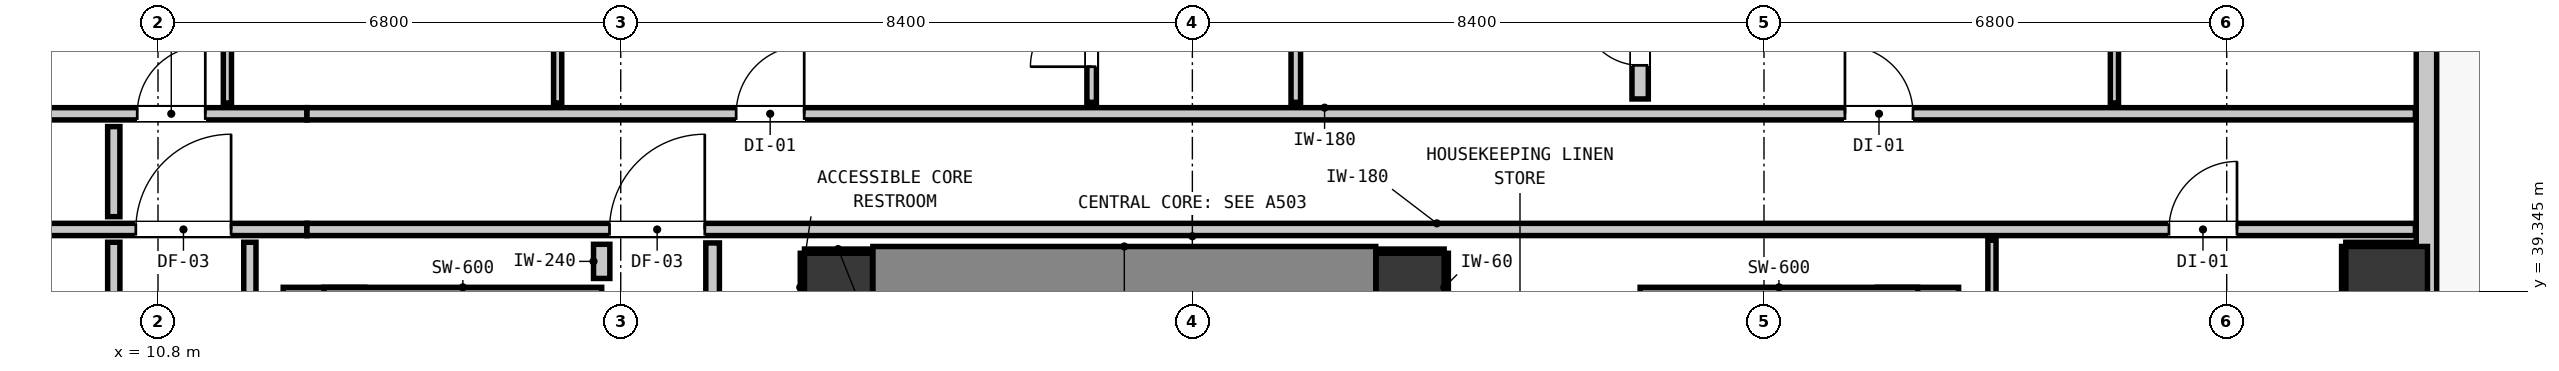
"""IFC4 building model, lengths in metres.
Left out: names, types, materials, properties, quantities, classifications, styles, units other than length and angle.
Written with IfcOpenShell. Run it as: python <this file> out.ifc"""

import sys

from ifc_helpers import new_model, si_unit, direction, frame, frame_2d, origin, origin_2d, place, context, subcontext, project, spatial, rectangle, extrude, element, fill, save


model = new_model("IFC4")
c1 = context("Model", 3, precision=1e-05, world=origin(), true_north=direction((0.0, 1.0)))
c2 = subcontext(c1, "Body", "Model", "MODEL_VIEW")
j1 = project(units=[si_unit("LENGTHUNIT", "METRE"), si_unit("PLANEANGLEUNIT", "RADIAN")], contexts=[c1])
p1 = place(None, origin())
s1 = spatial("IfcSite", under=j1, at=p1, CompositionType="ELEMENT")
p2 = place(p1, origin())
s2 = spatial("IfcBuilding", under=s1, at=p2, CompositionType="ELEMENT")
p3 = place(p2, frame((0.0, 0.0, 22.0)))
s3 = spatial("IfcBuildingStorey", under=s2, at=p3, CompositionType="ELEMENT", Elevation=22.0)
for number, where, z_axis, x_axis in (
    (1, (20.8, 39.4, 0.0), (0.0, 0.0, 1.0), (1.0, 0.0, 0.0)),
    (2, (29.2, 39.4, 0.0), (0.0, 0.0, 1.0), (1.0, 0.0, 0.0)),
):
    element("IfcColumn", number, at=place(p3, frame(where, z_axis=z_axis, x_axis=x_axis)), inside=s3, PredefinedType="COLUMN", context=c2, shape_type="SweptSolid", body=[
        extrude(rectangle(XDim=1.0, YDim=1.0, at=origin_2d()), origin(), (0.0, 0.0, 1.0), 3.32),
    ])
p4 = place(p3, frame((13.24, 31.205, 0.0), z_axis=(0.0, 0.0, 1.0), x_axis=(0.0, 1.0, 0.0)))
e3 = element("IfcWall", 3, at=p4, inside=s3, PredefinedType="SHEAR", context=c2, shape_type="SweptSolid", body=[
    extrude(rectangle(XDim=8.195, YDim=1.2, at=frame_2d((4.097, 0.0))), origin(), (0.0, 0.0, 1.0), 3.32),
])
p5 = place(p3, frame((13.24, 39.1, 0.0), z_axis=(0.0, 0.0, 1.0), x_axis=(1.0, 0.0, 0.0)))
e4 = element("IfcWall", 4, at=p5, inside=s3, PredefinedType="SHEAR", context=c2, shape_type="SweptSolid", body=[
    extrude(rectangle(XDim=4.08, YDim=0.6, at=frame_2d((2.04, 0.0))), origin(), (0.0, 0.0, 1.0), 3.32),
])
p6 = place(p3, frame((36.66, 31.205, 0.0), z_axis=(0.0, 0.0, 1.0), x_axis=(0.0, 1.0, 0.0)))
e5 = element("IfcWall", 5, at=p6, inside=s3, PredefinedType="SHEAR", context=c2, shape_type="SweptSolid", body=[
    extrude(rectangle(XDim=8.195, YDim=1.2, at=frame_2d((4.097, 0.0))), origin(), (0.0, 0.0, 1.0), 3.32),
])
p7 = place(p3, frame((32.58, 39.1, 0.0), z_axis=(0.0, 0.0, 1.0), x_axis=(1.0, 0.0, 0.0)))
e6 = element("IfcWall", 6, at=p7, inside=s3, PredefinedType="SHEAR", context=c2, shape_type="SweptSolid", body=[
    extrude(rectangle(XDim=4.08, YDim=0.6, at=frame_2d((2.04, 0.0))), origin(), (0.0, 0.0, 1.0), 3.32),
])
p8 = place(p3, frame((21.305, 39.4, 0.0), z_axis=(0.0, 0.0, 1.0), x_axis=(1.0, 0.0, 0.0)))
e7 = element("IfcWall", 7, at=p8, inside=s3, PredefinedType="SHEAR", context=c2, shape_type="SweptSolid", body=[
    extrude(rectangle(XDim=7.39, YDim=1.2, at=frame_2d((3.695, 0.0))), origin(), (0.0, 0.0, 1.0), 3.32),
])
p9 = place(p3, frame((43.55, 39.4, -0.2), z_axis=(0.0, 0.0, 1.0), x_axis=(1.0, 0.0, 0.0)))
e8 = element("IfcColumn", 8, at=p9, inside=s3, PredefinedType="COLUMN", context=c2, shape_type="SweptSolid", body=[
    extrude(rectangle(XDim=1.2, YDim=1.2, at=origin_2d()), origin(), (0.0, 0.0, 1.0), 3.52),
])
p10 = place(p3, frame((44.135, 44.835, 0.0), z_axis=(0.0, 0.0, 1.0), x_axis=(0.0, -1.0, 0.0)))
e9 = element("IfcWall", 9, at=p10, inside=s3, PredefinedType="STANDARD", context=c2, shape_type="SweptSolid", body=[
    extrude(rectangle(XDim=34.67, YDim=0.3, at=frame_2d((17.335, 0.0))), origin(), (0.0, 0.0, 1.0), 3.06),
])
p11 = place(p10, frame((0.501, 0.0, 0.0)))
e10 = element("IfcOpeningElement", 10, at=p11, cuts=e9, PredefinedType="OPENING", context=c2, shape_type="SweptSolid", body=[
    extrude(rectangle(XDim=1.1, YDim=2.15, at=frame_2d((0.55, 1.075))), frame((0.0, 0.16, 0.0), z_axis=(0.0, -1.0, 0.0), x_axis=(1.0, 0.0, 0.0)), (0.0, 0.0, 1.0), 0.32),
])
p12 = place(p10, frame((20.21, 0.0, 0.85)))
e11 = element("IfcOpeningElement", 11, at=p12, cuts=e9, PredefinedType="OPENING", context=c2, shape_type="SweptSolid", body=[
    extrude(rectangle(XDim=1.05, YDim=1.65, at=frame_2d((0.525, 0.825))), frame((0.0, 0.16, 0.0), z_axis=(0.0, -1.0, 0.0), x_axis=(1.0, 0.0, 0.0)), (0.0, 0.0, 1.0), 0.32),
])
p13 = place(p10, frame((7.426, 0.0, 0.85)))
e12 = element("IfcOpeningElement", 12, at=p13, cuts=e9, PredefinedType="OPENING", context=c2, shape_type="SweptSolid", body=[
    extrude(rectangle(XDim=1.05, YDim=1.65, at=frame_2d((0.525, 0.825))), frame((0.0, 0.16, 0.0), z_axis=(0.0, -1.0, 0.0), x_axis=(1.0, 0.0, 0.0)), (0.0, 0.0, 1.0), 0.32),
])
p14 = place(p3, frame((2.661, 40.25, 0.0), z_axis=(0.0, 0.0, 1.0), x_axis=(1.0, 0.0, 0.0)))
e13 = element("IfcWall", 13, at=p14, inside=s3, PredefinedType="PARTITIONING", context=c2, shape_type="SweptSolid", body=[
    extrude(rectangle(XDim=10.328, YDim=0.18, at=frame_2d((5.164, 0.0))), origin(), (0.0, 0.0, 1.0), 2.445),
])
p15 = place(p14, frame((7.813, 0.0, 0.0)))
e14 = element("IfcOpeningElement", 14, at=p15, cuts=e13, PredefinedType="OPENING", context=c2, shape_type="SweptSolid", body=[
    extrude(rectangle(XDim=1.4, YDim=2.15, at=frame_2d((0.7, 1.075))), frame((0.0, 0.1, 0.0), z_axis=(0.0, -1.0, 0.0), x_axis=(1.0, 0.0, 0.0)), (0.0, 0.0, 1.0), 0.2),
])
p16 = place(p3, frame((12.989, 40.25, 0.0), z_axis=(0.0, 0.0, 1.0), x_axis=(1.0, 0.0, 0.0)))
e15 = element("IfcWall", 15, at=p16, inside=s3, PredefinedType="PARTITIONING", context=c2, shape_type="SweptSolid", body=[
    extrude(rectangle(XDim=30.984, YDim=0.18, at=frame_2d((15.492, 0.0))), origin(), (0.0, 0.0, 1.0), 3.06),
])
p17 = place(p16, frame((4.446, 0.0, 0.0)))
e16 = element("IfcOpeningElement", 16, at=p17, cuts=e15, PredefinedType="OPENING", context=c2, shape_type="SweptSolid", body=[
    extrude(rectangle(XDim=1.4, YDim=2.15, at=frame_2d((0.7, 1.075))), frame((0.0, 0.1, 0.0), z_axis=(0.0, -1.0, 0.0), x_axis=(1.0, 0.0, 0.0)), (0.0, 0.0, 1.0), 0.2),
])
p18 = place(p16, frame((27.362, 0.0, 0.0)))
e17 = element("IfcOpeningElement", 17, at=p18, cuts=e15, PredefinedType="OPENING", context=c2, shape_type="SweptSolid", body=[
    extrude(rectangle(XDim=1.0, YDim=2.15, at=frame_2d((0.5, 1.075))), frame((0.0, 0.1, 0.0), z_axis=(0.0, -1.0, 0.0), x_axis=(1.0, 0.0, 0.0)), (0.0, 0.0, 1.0), 0.2),
])
p19 = place(p3, frame((2.661, 41.95, 0.0), z_axis=(0.0, 0.0, 1.0), x_axis=(1.0, 0.0, 0.0)))
e18 = element("IfcWall", 18, at=p19, inside=s3, PredefinedType="PARTITIONING", context=c2, shape_type="SweptSolid", body=[
    extrude(rectangle(XDim=10.328, YDim=0.18, at=frame_2d((5.164, 0.0))), origin(), (0.0, 0.0, 1.0), 2.445),
])
p20 = place(p19, frame((7.834, 0.0, 0.0)))
e19 = element("IfcOpeningElement", 19, at=p20, cuts=e18, PredefinedType="OPENING", context=c2, shape_type="SweptSolid", body=[
    extrude(rectangle(XDim=1.0, YDim=2.15, at=frame_2d((0.5, 1.075))), frame((0.0, 0.1, 0.0), z_axis=(0.0, -1.0, 0.0), x_axis=(1.0, 0.0, 0.0)), (0.0, 0.0, 1.0), 0.2),
])
p21 = place(p3, frame((12.989, 41.95, 0.0), z_axis=(0.0, 0.0, 1.0), x_axis=(1.0, 0.0, 0.0)))
e20 = element("IfcWall", 20, at=p21, inside=s3, PredefinedType="PARTITIONING", context=c2, shape_type="SweptSolid", body=[
    extrude(rectangle(XDim=30.984, YDim=0.18, at=frame_2d((15.492, 0.0))), origin(), (0.0, 0.0, 1.0), 3.06),
])
p22 = place(p21, frame((6.307, 0.0, 0.0)))
e21 = element("IfcOpeningElement", 21, at=p22, cuts=e20, PredefinedType="OPENING", context=c2, shape_type="SweptSolid", body=[
    extrude(rectangle(XDim=1.0, YDim=2.15, at=frame_2d((0.5, 1.075))), frame((0.0, 0.1, 0.0), z_axis=(0.0, -1.0, 0.0), x_axis=(1.0, 0.0, 0.0)), (0.0, 0.0, 1.0), 0.2),
])
p23 = place(p21, frame((22.601, 0.0, 0.0)))
e22 = element("IfcOpeningElement", 22, at=p23, cuts=e20, PredefinedType="OPENING", context=c2, shape_type="SweptSolid", body=[
    extrude(rectangle(XDim=1.0, YDim=2.15, at=frame_2d((0.5, 1.075))), frame((0.0, 0.1, 0.0), z_axis=(0.0, -1.0, 0.0), x_axis=(1.0, 0.0, 0.0)), (0.0, 0.0, 1.0), 0.2),
])
p24 = place(p3, frame((17.32, 39.53, 0.0), z_axis=(0.0, 0.0, 1.0), x_axis=(0.0, 1.0, 0.0)))
e23 = element("IfcWall", 23, at=p24, inside=s3, PredefinedType="PARTITIONING", context=c2, shape_type="SweptSolid", body=[
    extrude(rectangle(XDim=0.502, YDim=0.24, at=frame_2d((0.251, 0.0))), origin(), (0.0, 0.0, 1.0), 3.06),
])
p25 = place(p3, frame((32.58, 42.168, 0.0), z_axis=(0.0, 0.0, 1.0), x_axis=(0.0, 1.0, 0.0)))
e24 = element("IfcWall", 24, at=p25, inside=s3, PredefinedType="PARTITIONING", context=c2, shape_type="SweptSolid", body=[
    extrude(rectangle(XDim=1.842, YDim=0.24, at=frame_2d((0.921, 0.0))), origin(), (0.0, 0.0, 1.0), 3.06),
])
p26 = place(p25, frame((0.494, 0.0, 0.0)))
e25 = element("IfcOpeningElement", 25, at=p26, cuts=e24, PredefinedType="OPENING", context=c2, shape_type="SweptSolid", body=[
    extrude(rectangle(XDim=0.86, YDim=2.02, at=frame_2d((0.43, 1.01))), frame((0.0, 0.13, 0.0), z_axis=(0.0, -1.0, 0.0), x_axis=(1.0, 0.0, 0.0)), (0.0, 0.0, 1.0), 0.26),
])
p27 = place(p3, frame((18.95, 38.928, 0.0), z_axis=(0.0, 0.0, 1.0), x_axis=(0.0, 1.0, 0.0)))
e26 = element("IfcWall", 26, at=p27, inside=s3, PredefinedType="PARTITIONING", context=c2, shape_type="SweptSolid", body=[
    extrude(rectangle(XDim=1.124, YDim=0.2, at=frame_2d((0.562, 0.0))), origin(), (0.0, 0.0, 1.0), 3.06),
])
p28 = place(p3, frame((10.15, 37.313, 0.0), z_axis=(0.0, 0.0, 1.0), x_axis=(0.0, 1.0, 0.0)))
e27 = element("IfcWall", 27, at=p28, inside=s3, PredefinedType="PARTITIONING", context=c2, shape_type="SweptSolid", body=[
    extrude(rectangle(XDim=2.749, YDim=0.18, at=frame_2d((1.375, 0.0))), origin(), (0.0, 0.0, 1.0), 3.06),
])
p29 = place(p3, frame((10.15, 40.438, 0.0), z_axis=(0.0, 0.0, 1.0), x_axis=(0.0, 1.0, 0.0)))
e28 = element("IfcWall", 28, at=p29, inside=s3, PredefinedType="PARTITIONING", context=c2, shape_type="SweptSolid", body=[
    extrude(rectangle(XDim=1.324, YDim=0.18, at=frame_2d((0.662, 0.0))), origin(), (0.0, 0.0, 1.0), 3.06),
])
p30 = place(p3, frame((12.15, 21.368, 0.0), z_axis=(0.0, 0.0, 1.0), x_axis=(0.0, 1.0, 0.0)))
e29 = element("IfcWall", 29, at=p30, inside=s3, PredefinedType="PARTITIONING", context=c2, shape_type="SweptSolid", body=[
    extrude(rectangle(XDim=18.694, YDim=0.18, at=frame_2d((9.347, 0.0))), origin(), (0.0, 0.0, 1.0), 3.06),
])
p31 = place(p3, frame((24.52, 42.118, 0.0), z_axis=(0.0, 0.0, 1.0), x_axis=(0.0, 1.0, 0.0)))
e30 = element("IfcWall", 30, at=p31, inside=s3, PredefinedType="PARTITIONING", context=c2, shape_type="SweptSolid", body=[
    extrude(rectangle(XDim=1.942, YDim=0.14, at=frame_2d((0.971, 0.0))), origin(), (0.0, 0.0, 1.0), 3.06),
])
p32 = place(p31, frame((0.524, 0.0, 0.0)))
e31 = element("IfcOpeningElement", 31, at=p32, cuts=e30, PredefinedType="OPENING", context=c2, shape_type="SweptSolid", body=[
    extrude(rectangle(XDim=0.9, YDim=2.1, at=frame_2d((0.45, 1.05))), frame((0.0, 0.08, 0.0), z_axis=(0.0, -1.0, 0.0), x_axis=(1.0, 0.0, 0.0)), (0.0, 0.0, 1.0), 0.16),
])
p33 = place(p3, frame((27.52, 42.118, 0.0), z_axis=(0.0, 0.0, 1.0), x_axis=(0.0, 1.0, 0.0)))
e32 = element("IfcWall", 32, at=p33, inside=s3, PredefinedType="PARTITIONING", context=c2, shape_type="SweptSolid", body=[
    extrude(rectangle(XDim=1.942, YDim=0.14, at=frame_2d((0.971, 0.0))), origin(), (0.0, 0.0, 1.0), 3.06),
])
p34 = place(p3, frame((11.82, 42.108, 0.0), z_axis=(0.0, 0.0, 1.0), x_axis=(0.0, 1.0, 0.0)))
e33 = element("IfcWall", 33, at=p34, inside=s3, PredefinedType="PARTITIONING", context=c2, shape_type="SweptSolid", body=[
    extrude(rectangle(XDim=5.065, YDim=0.12, at=frame_2d((2.533, 0.0))), origin(), (0.0, 0.0, 1.0), 3.06),
])
p35 = place(p34, frame((2.017, 0.0, 0.0)))
e34 = element("IfcOpeningElement", 34, at=p35, cuts=e33, PredefinedType="OPENING", context=c2, shape_type="SweptSolid", body=[
    extrude(rectangle(XDim=0.9, YDim=2.1, at=frame_2d((0.45, 1.05))), frame((0.0, 0.07, 0.0), z_axis=(0.0, -1.0, 0.0), x_axis=(1.0, 0.0, 0.0)), (0.0, 0.0, 1.0), 0.14),
])
p36 = place(p3, frame((16.673, 42.108, 0.0), z_axis=(0.0, 0.0, 1.0), x_axis=(0.0, 1.0, 0.0)))
e35 = element("IfcWall", 35, at=p36, inside=s3, PredefinedType="PARTITIONING", context=c2, shape_type="SweptSolid", body=[
    extrude(rectangle(XDim=5.065, YDim=0.12, at=frame_2d((2.533, 0.0))), origin(), (0.0, 0.0, 1.0), 3.06),
])
p37 = place(p3, frame((37.75, 35.006, 0.0), z_axis=(0.0, 0.0, 1.0), x_axis=(0.0, 1.0, 0.0)))
e36 = element("IfcWall", 36, at=p37, inside=s3, PredefinedType="PARTITIONING", context=c2, shape_type="SweptSolid", body=[
    extrude(rectangle(XDim=5.086, YDim=0.12, at=frame_2d((2.543, 0.0))), origin(), (0.0, 0.0, 1.0), 3.06),
])
p38 = place(p3, frame((39.55, 42.108, 0.0), z_axis=(0.0, 0.0, 1.0), x_axis=(0.0, 1.0, 0.0)))
e37 = element("IfcWall", 37, at=p38, inside=s3, PredefinedType="PARTITIONING", context=c2, shape_type="SweptSolid", body=[
    extrude(rectangle(XDim=5.065, YDim=0.12, at=frame_2d((2.533, 0.0))), origin(), (0.0, 0.0, 1.0), 3.06),
])
p39 = place(p38, frame((2.017, 0.0, 0.0)))
e38 = element("IfcOpeningElement", 38, at=p39, cuts=e37, PredefinedType="OPENING", context=c2, shape_type="SweptSolid", body=[
    extrude(rectangle(XDim=0.9, YDim=2.1, at=frame_2d((0.45, 1.05))), frame((0.0, 0.07, 0.0), z_axis=(0.0, -1.0, 0.0), x_axis=(1.0, 0.0, 0.0)), (0.0, 0.0, 1.0), 0.14),
])
p40 = place(p3, frame((20.3, 39.932, 0.0), z_axis=(0.0, 0.0, 1.0), x_axis=(1.0, 0.0, 0.0)))
e39 = element("IfcWall", 39, at=p40, inside=s3, PredefinedType="PARTITIONING", context=c2, shape_type="SweptSolid", body=[
    extrude(rectangle(XDim=0.99, YDim=0.06, at=frame_2d((0.495, 0.0))), origin(), (0.0, 0.0, 1.0), 1.45),
])
p41 = place(p3, frame((20.268, 38.9, 0.0), z_axis=(0.0, 0.0, 1.0), x_axis=(0.0, 1.0, 0.0)))
e40 = element("IfcWall", 40, at=p41, inside=s3, PredefinedType="PARTITIONING", context=c2, shape_type="SweptSolid", body=[
    extrude(rectangle(XDim=1.0, YDim=0.06, at=frame_2d((0.5, 0.0))), origin(), (0.0, 0.0, 1.0), 1.45),
])
p42 = place(p3, frame((28.71, 39.932, 0.0), z_axis=(0.0, 0.0, 1.0), x_axis=(1.0, 0.0, 0.0)))
e41 = element("IfcWall", 41, at=p42, inside=s3, PredefinedType="PARTITIONING", context=c2, shape_type="SweptSolid", body=[
    extrude(rectangle(XDim=0.99, YDim=0.06, at=frame_2d((0.495, 0.0))), origin(), (0.0, 0.0, 1.0), 1.45),
])
p43 = place(p3, frame((29.732, 38.9, 0.0), z_axis=(0.0, 0.0, 1.0), x_axis=(0.0, 1.0, 0.0)))
e42 = element("IfcWall", 42, at=p43, inside=s3, PredefinedType="PARTITIONING", context=c2, shape_type="SweptSolid", body=[
    extrude(rectangle(XDim=1.0, YDim=0.06, at=frame_2d((0.5, 0.0))), origin(), (0.0, 0.0, 1.0), 1.45),
])
p44 = place(p3, frame((42.95, 40.032, 0.0), z_axis=(0.0, 0.0, 1.0), x_axis=(1.0, 0.0, 0.0)))
e43 = element("IfcWall", 43, at=p44, inside=s3, PredefinedType="PARTITIONING", context=c2, shape_type="SweptSolid", body=[
    extrude(rectangle(XDim=1.02, YDim=0.06, at=frame_2d((0.51, 0.0))), origin(), (0.0, 0.0, 1.0), 1.45),
])
p45 = place(p3, frame((42.918, 38.8, 0.0), z_axis=(0.0, 0.0, 1.0), x_axis=(0.0, 1.0, 0.0)))
e44 = element("IfcWall", 44, at=p45, inside=s3, PredefinedType="PARTITIONING", context=c2, shape_type="SweptSolid", body=[
    extrude(rectangle(XDim=1.2, YDim=0.06, at=frame_2d((0.6, 0.0))), origin(), (0.0, 0.0, 1.0), 1.45),
])
p46 = place(p17, origin())
e45 = element("IfcDoor", 45, at=p46, inside=s3, OperationType="SINGLE_SWING_RIGHT", PredefinedType="DOOR", context=c2, shape_type="SweptSolid", body=[
    extrude(rectangle(XDim=1.4, YDim=2.15, at=frame_2d((0.7, 1.075))), frame((0.0, 0.025, 0.0), z_axis=(0.0, -1.0, 0.0), x_axis=(1.0, 0.0, 0.0)), (0.0, 0.0, 1.0), 0.05),
])
fill(e16, e45)
p47 = place(p15, origin())
e46 = element("IfcDoor", 46, at=p47, inside=s3, OperationType="SINGLE_SWING_RIGHT", PredefinedType="DOOR", context=c2, shape_type="SweptSolid", body=[
    extrude(rectangle(XDim=1.4, YDim=2.15, at=frame_2d((0.7, 1.075))), frame((0.0, 0.025, 0.0), z_axis=(0.0, -1.0, 0.0), x_axis=(1.0, 0.0, 0.0)), (0.0, 0.0, 1.0), 0.05),
])
fill(e14, e46)
p48 = place(p20, origin())
e47 = element("IfcDoor", 47, at=p48, inside=s3, OperationType="SINGLE_SWING_RIGHT", PredefinedType="DOOR", context=c2, shape_type="SweptSolid", body=[
    extrude(rectangle(XDim=1.0, YDim=2.15, at=frame_2d((0.5, 1.075))), frame((0.0, 0.025, 0.0), z_axis=(0.0, -1.0, 0.0), x_axis=(1.0, 0.0, 0.0)), (0.0, 0.0, 1.0), 0.05),
])
fill(e19, e47)
p49 = place(p22, origin())
e48 = element("IfcDoor", 48, at=p49, inside=s3, OperationType="SINGLE_SWING_RIGHT", PredefinedType="DOOR", context=c2, shape_type="SweptSolid", body=[
    extrude(rectangle(XDim=1.0, YDim=2.15, at=frame_2d((0.5, 1.075))), frame((0.0, 0.025, 0.0), z_axis=(0.0, -1.0, 0.0), x_axis=(1.0, 0.0, 0.0)), (0.0, 0.0, 1.0), 0.05),
])
fill(e21, e48)
p50 = place(p32, origin())
e49 = element("IfcDoor", 49, at=p50, inside=s3, OperationType="SINGLE_SWING_LEFT", PredefinedType="DOOR", context=c2, shape_type="SweptSolid", body=[
    extrude(rectangle(XDim=0.9, YDim=2.1, at=frame_2d((0.45, 1.05))), frame((0.0, 0.025, 0.0), z_axis=(0.0, -1.0, 0.0), x_axis=(1.0, 0.0, 0.0)), (0.0, 0.0, 1.0), 0.05),
])
fill(e31, e49)
p51 = place(p23, origin())
e50 = element("IfcDoor", 50, at=p51, inside=s3, OperationType="SINGLE_SWING_LEFT", PredefinedType="DOOR", context=c2, shape_type="SweptSolid", body=[
    extrude(rectangle(XDim=1.0, YDim=2.15, at=frame_2d((0.5, 1.075))), frame((0.0, 0.025, 0.0), z_axis=(0.0, -1.0, 0.0), x_axis=(1.0, 0.0, 0.0)), (0.0, 0.0, 1.0), 0.05),
])
fill(e22, e50)
p52 = place(p26, origin())
e51 = element("IfcDoor", 51, at=p52, inside=s3, OperationType="SINGLE_SWING_RIGHT", PredefinedType="DOOR", context=c2, shape_type="SweptSolid", body=[
    extrude(rectangle(XDim=0.86, YDim=2.02, at=frame_2d((0.43, 1.01))), frame((0.0, 0.025, 0.0), z_axis=(0.0, -1.0, 0.0), x_axis=(1.0, 0.0, 0.0)), (0.0, 0.0, 1.0), 0.05),
])
fill(e25, e51)
p53 = place(p18, origin())
e52 = element("IfcDoor", 52, at=p53, inside=s3, OperationType="SINGLE_SWING_RIGHT", PredefinedType="DOOR", context=c2, shape_type="SweptSolid", body=[
    extrude(rectangle(XDim=1.0, YDim=2.15, at=frame_2d((0.5, 1.075))), frame((0.0, 0.025, 0.0), z_axis=(0.0, -1.0, 0.0), x_axis=(1.0, 0.0, 0.0)), (0.0, 0.0, 1.0), 0.05),
])
fill(e17, e52)
save(model, sys.argv[1])
